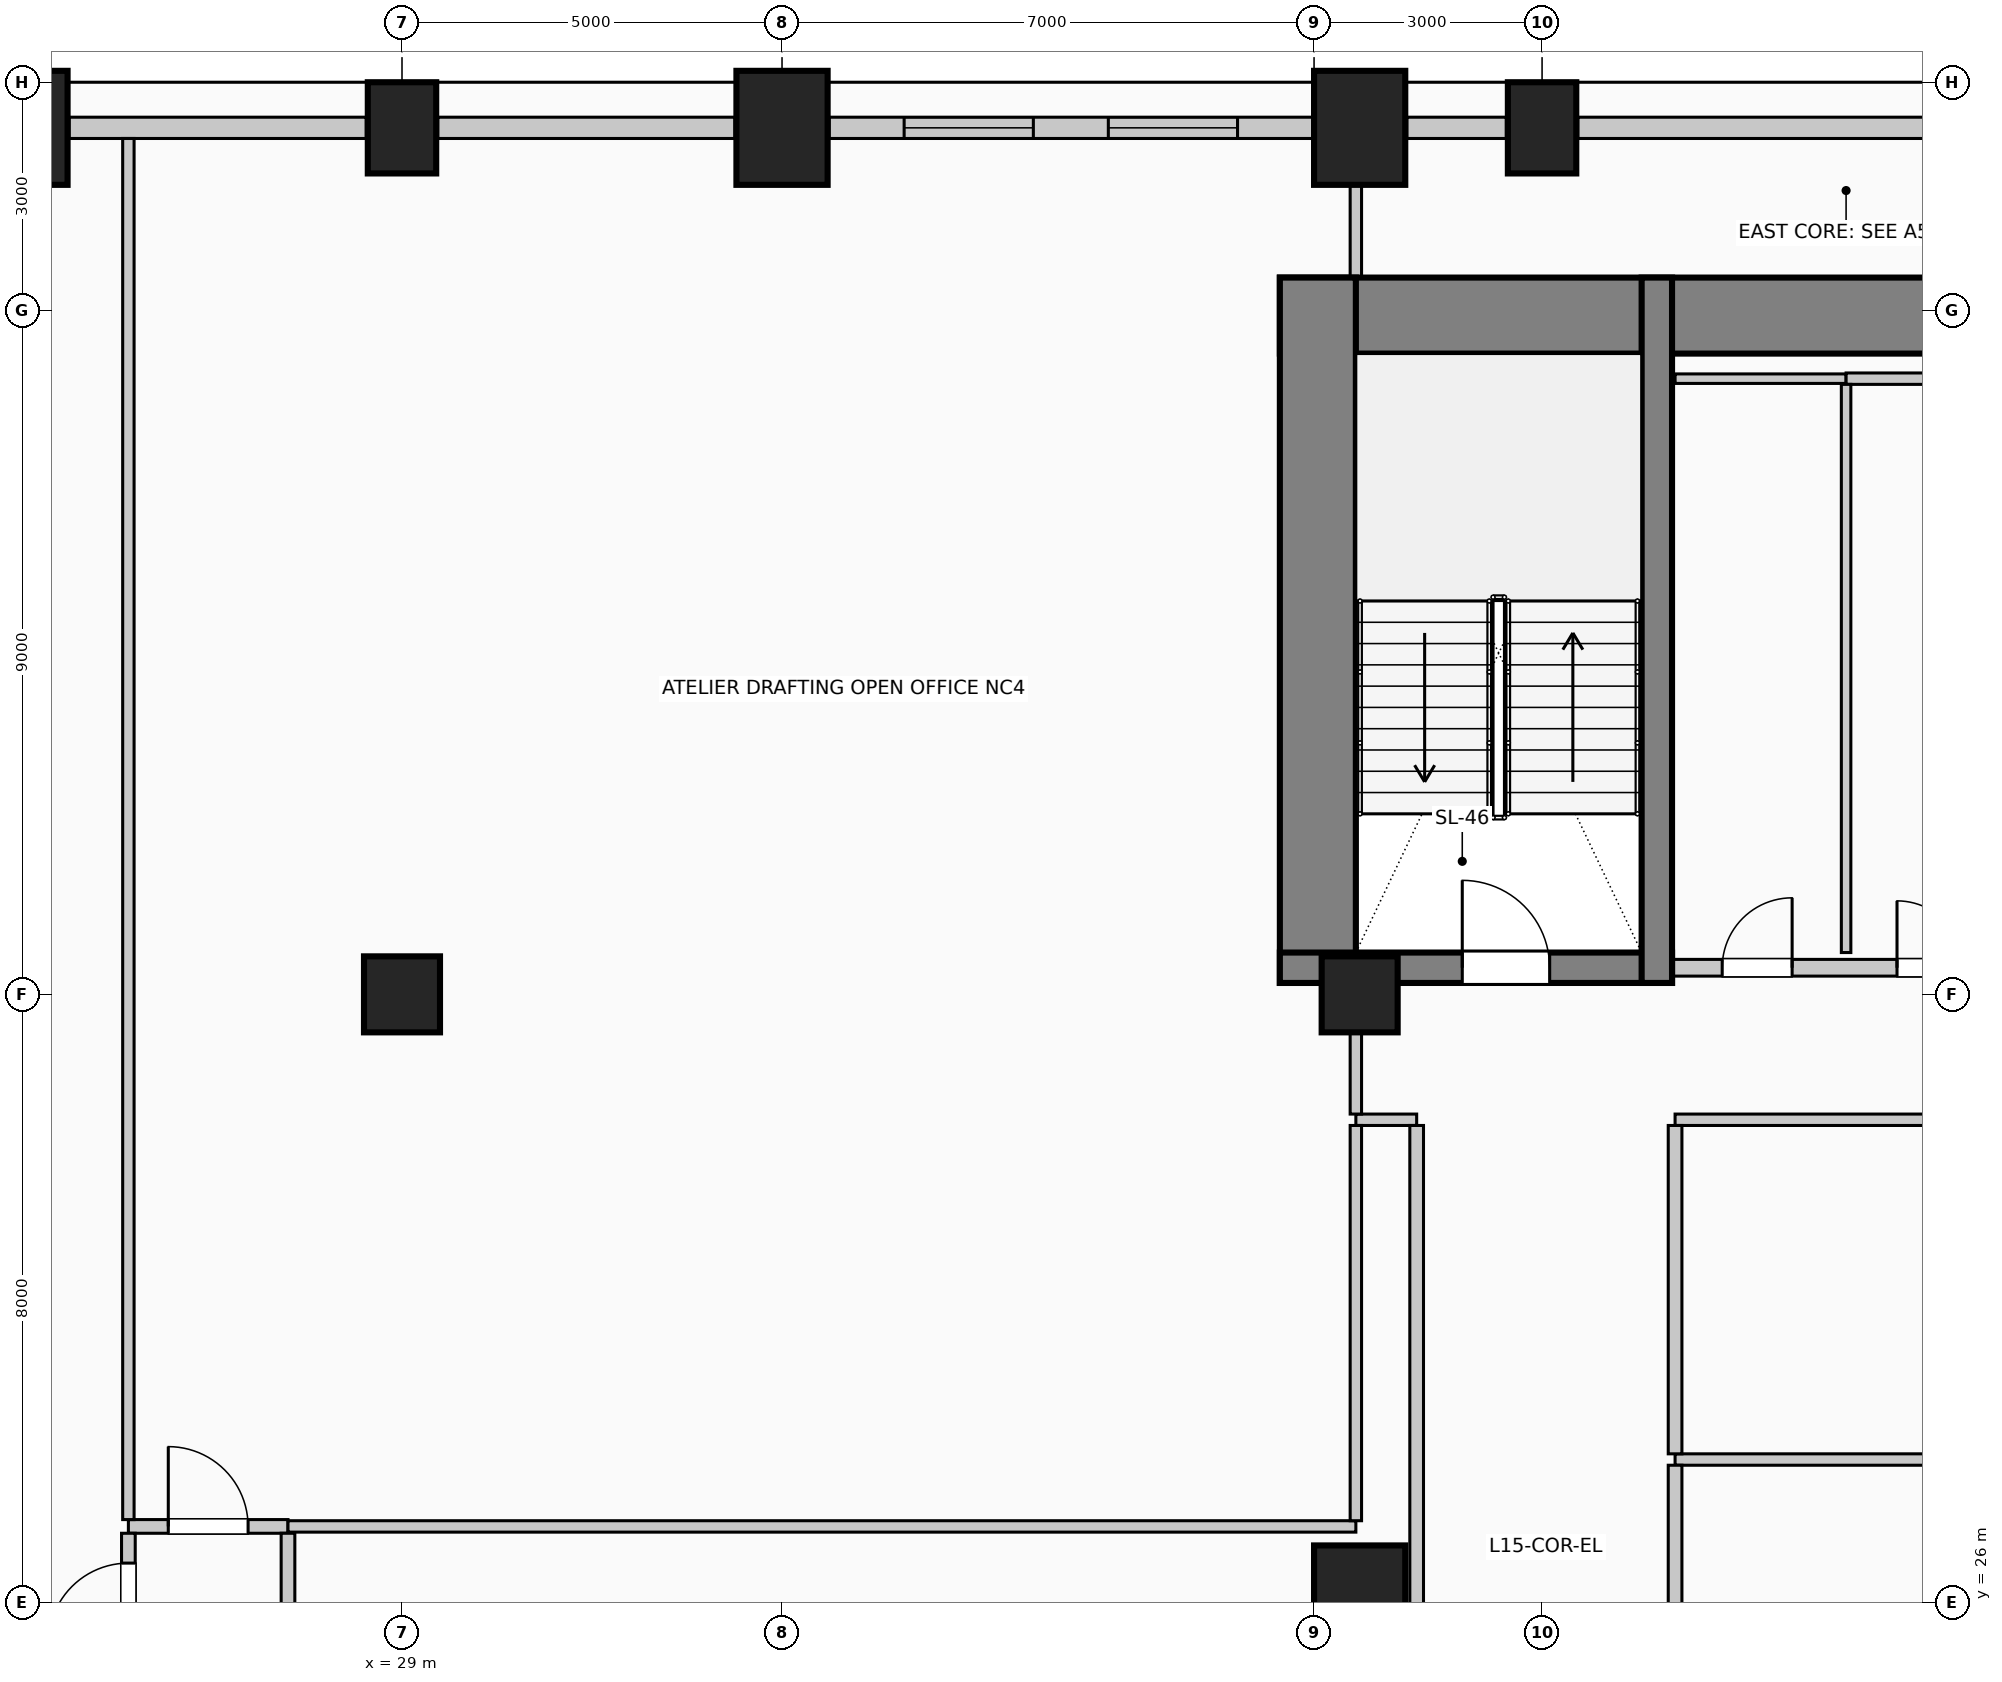
"""IFC4 building model, lengths in metres.
Left out: names, types, materials, properties, quantities, classifications, styles, units other than length and angle.
Written with IfcOpenShell. Run it as: python <this file> out.ifc"""

import sys

from ifc_helpers import new_model, si_unit, direction, frame, frame_2d, origin, origin_2d, place, context, subcontext, project, spatial, rectangle, circle, extrude, element, fill, save


model = new_model("IFC4")
c1 = context("Model", 3, precision=1e-05, world=origin(), true_north=direction((0.0, 1.0)))
c2 = subcontext(c1, "Body", "Model", "MODEL_VIEW")
j1 = project(units=[si_unit("LENGTHUNIT", "METRE"), si_unit("PLANEANGLEUNIT", "RADIAN")], contexts=[c1])
p1 = place(None, origin())
s1 = spatial("IfcSite", under=j1, at=p1, CompositionType="ELEMENT")
p2 = place(p1, origin())
s2 = spatial("IfcBuilding", under=s1, at=p2, CompositionType="ELEMENT")
p3 = place(p2, frame((0.0, 0.0, 62.6)))
s3 = spatial("IfcBuildingStorey", under=s2, at=p3, CompositionType="ELEMENT", Elevation=62.6)
p4 = place(p3, frame((40.55, 42.93, 0.0), z_axis=(0.0, 0.0, 1.0), x_axis=(1.0, 0.0, 0.0)))
e1 = element("IfcWall", 1, at=p4, inside=s3, PredefinedType="SHEAR", context=c2, shape_type="SweptSolid", body=[
    extrude(rectangle(XDim=14.9, YDim=1.0, at=frame_2d((7.45, 0.0))), origin(), (0.0, 0.0, 1.0), 4.0),
])
p5 = place(p3, frame((41.05, 34.15, 0.0), z_axis=(0.0, 0.0, 1.0), x_axis=(0.0, 1.0, 0.0)))
e2 = element("IfcWall", 2, at=p5, inside=s3, PredefinedType="SHEAR", context=c2, shape_type="SweptSolid", body=[
    extrude(rectangle(XDim=9.28, YDim=1.0, at=frame_2d((4.64, 0.0))), origin(), (0.0, 0.0, 1.0), 4.0),
])
p6 = place(p3, frame((40.55, 34.35, 0.0), z_axis=(0.0, 0.0, 1.0), x_axis=(1.0, 0.0, 0.0)))
e3 = element("IfcWall", 3, at=p6, inside=s3, PredefinedType="SHEAR", context=c2, shape_type="SweptSolid", body=[
    extrude(rectangle(XDim=5.16, YDim=0.4, at=frame_2d((2.58, 0.0))), origin(), (0.0, 0.0, 1.0), 4.0),
])
p7 = place(p6, frame((2.4, 0.0, 0.0)))
e4 = element("IfcOpeningElement", 4, at=p7, cuts=e3, PredefinedType="OPENING", context=c2, shape_type="SweptSolid", body=[
    extrude(rectangle(XDim=1.15, YDim=2.2, at=frame_2d((0.575, 1.1))), frame((0.0, 0.21, 0.0), z_axis=(0.0, -1.0, 0.0), x_axis=(1.0, 0.0, 0.0)), (0.0, 0.0, 1.0), 0.42),
])
p8 = place(p3, frame((45.51, 34.15, 0.0), z_axis=(0.0, 0.0, 1.0), x_axis=(0.0, 1.0, 0.0)))
e5 = element("IfcWall", 5, at=p8, inside=s3, PredefinedType="SHEAR", context=c2, shape_type="SweptSolid", body=[
    extrude(rectangle(XDim=9.28, YDim=0.4, at=frame_2d((4.64, 0.0))), origin(), (0.0, 0.0, 1.0), 4.0),
])
p9 = place(p3, frame((24.0, 45.4, 0.0), z_axis=(0.0, 0.0, 1.0), x_axis=(1.0, 0.0, 0.0)))
e6 = element("IfcColumn", 6, at=p9, inside=s3, PredefinedType="COLUMN", context=c2, shape_type="SweptSolid", body=[
    extrude(rectangle(XDim=1.2, YDim=1.5, at=origin_2d()), origin(), (0.0, 0.0, 1.0), 4.0),
])
p10 = place(p3, frame((29.0, 45.4, 0.0), z_axis=(0.0, 0.0, 1.0), x_axis=(1.0, 0.0, 0.0)))
e7 = element("IfcColumn", 7, at=p10, inside=s3, PredefinedType="COLUMN", context=c2, shape_type="SweptSolid", body=[
    extrude(rectangle(XDim=0.9, YDim=1.2, at=origin_2d()), origin(), (0.0, 0.0, 1.0), 4.0),
])
for number, where, z_axis, x_axis in (
    (8, (34.0, 45.4, 0.0), (0.0, 0.0, 1.0), (1.0, 0.0, 0.0)),
    (9, (41.6, 45.4, 0.0), (0.0, 0.0, 1.0), (1.0, 0.0, 0.0)),
):
    element("IfcColumn", number, at=place(p3, frame(where, z_axis=z_axis, x_axis=x_axis)), inside=s3, PredefinedType="COLUMN", context=c2, shape_type="SweptSolid", body=[
        extrude(rectangle(XDim=1.2, YDim=1.5, at=origin_2d()), origin(), (0.0, 0.0, 1.0), 4.0),
    ])
p11 = place(p3, frame((44.0, 45.4, 0.0), z_axis=(0.0, 0.0, 1.0), x_axis=(1.0, 0.0, 0.0)))
e10 = element("IfcColumn", 10, at=p11, inside=s3, PredefinedType="COLUMN", context=c2, shape_type="SweptSolid", body=[
    extrude(rectangle(XDim=0.9, YDim=1.2, at=origin_2d()), origin(), (0.0, 0.0, 1.0), 4.0),
])
p12 = place(p3, frame((41.6, 26.0, 0.0), z_axis=(0.0, 0.0, 1.0), x_axis=(1.0, 0.0, 0.0)))
e11 = element("IfcColumn", 11, at=p12, inside=s3, PredefinedType="COLUMN", context=c2, shape_type="SweptSolid", body=[
    extrude(rectangle(XDim=1.2, YDim=1.5, at=origin_2d()), origin(), (0.0, 0.0, 1.0), 4.0),
])
for number, where, z_axis, x_axis in (
    (12, (29.0, 34.0, 0.0), (0.0, 0.0, 1.0), (1.0, 0.0, 0.0)),
    (13, (41.6, 34.0, 0.0), (0.0, 0.0, 1.0), (1.0, 0.0, 0.0)),
):
    element("IfcColumn", number, at=place(p3, frame(where, z_axis=z_axis, x_axis=x_axis)), inside=s3, PredefinedType="COLUMN", context=c2, shape_type="SweptSolid", body=[
        extrude(circle(Radius=0.5, at=origin_2d()), origin(), (0.0, 0.0, 1.0), 4.0),
    ])
for number, where, z_axis, x_axis in (
    (14, (24.62, 45.4, 0.0), (0.0, 0.0, 1.0), (1.0, 0.0, 0.0)),
    (15, (29.47, 45.4, 0.0), (0.0, 0.0, 1.0), (1.0, 0.0, 0.0)),
):
    element("IfcWall", number, at=place(p3, frame(where, z_axis=z_axis, x_axis=x_axis)), inside=s3, PredefinedType="SOLIDWALL", context=c2, shape_type="SweptSolid", body=[
        extrude(rectangle(XDim=3.91, YDim=0.28, at=frame_2d((1.955, 0.0))), origin(), (0.0, 0.0, 1.0), 2.85),
    ])
p13 = place(p3, frame((34.62, 45.4, 0.0), z_axis=(0.0, 0.0, 1.0), x_axis=(1.0, 0.0, 0.0)))
e16 = element("IfcWall", 16, at=p13, inside=s3, PredefinedType="SOLIDWALL", context=c2, shape_type="SweptSolid", body=[
    extrude(rectangle(XDim=6.36, YDim=0.28, at=frame_2d((3.18, 0.0))), origin(), (0.0, 0.0, 1.0), 2.85),
])
p14 = place(p13, frame((0.987, 0.0, 0.5)))
e17 = element("IfcOpeningElement", 17, at=p14, cuts=e16, PredefinedType="OPENING", context=c2, shape_type="SweptSolid", body=[
    extrude(rectangle(XDim=1.7, YDim=1.95, at=frame_2d((0.85, 0.975))), frame((0.0, 0.15, 0.0), z_axis=(0.0, -1.0, 0.0), x_axis=(1.0, 0.0, 0.0)), (0.0, 0.0, 1.0), 0.3),
])
p15 = place(p13, frame((3.673, 0.0, 0.5)))
e18 = element("IfcOpeningElement", 18, at=p15, cuts=e16, PredefinedType="OPENING", context=c2, shape_type="SweptSolid", body=[
    extrude(rectangle(XDim=1.7, YDim=1.95, at=frame_2d((0.85, 0.975))), frame((0.0, 0.15, 0.0), z_axis=(0.0, -1.0, 0.0), x_axis=(1.0, 0.0, 0.0)), (0.0, 0.0, 1.0), 0.3),
])
p16 = place(p3, frame((42.22, 45.4, 0.0), z_axis=(0.0, 0.0, 1.0), x_axis=(1.0, 0.0, 0.0)))
e19 = element("IfcWall", 19, at=p16, inside=s3, PredefinedType="SOLIDWALL", context=c2, shape_type="SweptSolid", body=[
    extrude(rectangle(XDim=1.31, YDim=0.28, at=frame_2d((0.655, 0.0))), origin(), (0.0, 0.0, 1.0), 2.85),
])
p17 = place(p3, frame((44.47, 45.4, 0.0), z_axis=(0.0, 0.0, 1.0), x_axis=(1.0, 0.0, 0.0)))
e20 = element("IfcWall", 20, at=p17, inside=s3, PredefinedType="SOLIDWALL", context=c2, shape_type="SweptSolid", body=[
    extrude(rectangle(XDim=4.56, YDim=0.28, at=frame_2d((2.28, 0.0))), origin(), (0.0, 0.0, 1.0), 2.85),
])
p18 = place(p3, frame((45.72, 34.35, 0.0), z_axis=(0.0, 0.0, 1.0), x_axis=(1.0, 0.0, 0.0)))
e21 = element("IfcWall", 21, at=p18, inside=s3, PredefinedType="PARTITIONING", context=c2, shape_type="SweptSolid", body=[
    extrude(rectangle(XDim=4.56, YDim=0.22, at=frame_2d((2.28, 0.0))), origin(), (0.0, 0.0, 1.0), 3.7),
])
p19 = place(p18, frame((0.65, 0.0, 0.0)))
e22 = element("IfcOpeningElement", 22, at=p19, cuts=e21, PredefinedType="OPENING", context=c2, shape_type="SweptSolid", body=[
    extrude(rectangle(XDim=0.92, YDim=2.1, at=frame_2d((0.46, 1.05))), frame((0.0, 0.12, 0.0), z_axis=(0.0, -1.0, 0.0), x_axis=(1.0, 0.0, 0.0)), (0.0, 0.0, 1.0), 0.24),
])
p20 = place(p18, frame((2.95, 0.0, 0.0)))
e23 = element("IfcOpeningElement", 23, at=p20, cuts=e21, PredefinedType="OPENING", context=c2, shape_type="SweptSolid", body=[
    extrude(rectangle(XDim=0.88, YDim=2.1, at=frame_2d((0.44, 1.05))), frame((0.0, 0.12, 0.0), z_axis=(0.0, -1.0, 0.0), x_axis=(1.0, 0.0, 0.0)), (0.0, 0.0, 1.0), 0.24),
])
p21 = place(p3, frame((25.4, 27.0, 0.0), z_axis=(0.0, 0.0, 1.0), x_axis=(1.0, 0.0, 0.0)))
e24 = element("IfcWall", 24, at=p21, inside=s3, PredefinedType="PARTITIONING", context=c2, shape_type="SweptSolid", body=[
    extrude(rectangle(XDim=2.1, YDim=0.18, at=frame_2d((1.05, 0.0))), origin(), (0.0, 0.0, 1.0), 3.7),
])
p22 = place(p21, frame((0.525, 0.0, 0.0)))
e25 = element("IfcOpeningElement", 25, at=p22, cuts=e24, PredefinedType="OPENING", context=c2, shape_type="SweptSolid", body=[
    extrude(rectangle(XDim=1.05, YDim=2.15, at=frame_2d((0.525, 1.075))), frame((0.0, 0.1, 0.0), z_axis=(0.0, -1.0, 0.0), x_axis=(1.0, 0.0, 0.0)), (0.0, 0.0, 1.0), 0.2),
])
p23 = place(p3, frame((27.5, 27.0, 0.0), z_axis=(0.0, 0.0, 1.0), x_axis=(1.0, 0.0, 0.0)))
e26 = element("IfcWall", 26, at=p23, inside=s3, PredefinedType="PARTITIONING", context=c2, shape_type="SweptSolid", body=[
    extrude(rectangle(XDim=14.05, YDim=0.15, at=frame_2d((7.025, 0.0))), origin(), (0.0, 0.0, 1.0), 3.7),
])
p24 = place(p3, frame((45.75, 27.88, 0.0), z_axis=(0.0, 0.0, 1.0), x_axis=(1.0, 0.0, 0.0)))
e27 = element("IfcWall", 27, at=p24, inside=s3, PredefinedType="PARTITIONING", context=c2, shape_type="SweptSolid", body=[
    extrude(rectangle(XDim=11.51, YDim=0.15, at=frame_2d((5.755, 0.0))), origin(), (0.0, 0.0, 1.0), 3.7),
])
p25 = place(p3, frame((41.55, 32.35, 0.0), z_axis=(0.0, 0.0, 1.0), x_axis=(1.0, 0.0, 0.0)))
e28 = element("IfcWall", 28, at=p25, inside=s3, PredefinedType="PARTITIONING", context=c2, shape_type="SweptSolid", body=[
    extrude(rectangle(XDim=0.8, YDim=0.15, at=frame_2d((0.4, 0.0))), origin(), (0.0, 0.0, 1.0), 3.7),
])
p26 = place(p3, frame((45.75, 32.35, 0.0), z_axis=(0.0, 0.0, 1.0), x_axis=(1.0, 0.0, 0.0)))
e29 = element("IfcWall", 29, at=p26, inside=s3, PredefinedType="PARTITIONING", context=c2, shape_type="SweptSolid", body=[
    extrude(rectangle(XDim=8.7, YDim=0.15, at=frame_2d((4.35, 0.0))), origin(), (0.0, 0.0, 1.0), 3.7),
])
p27 = place(p26, frame((3.91, 0.0, 0.0)))
e30 = element("IfcOpeningElement", 30, at=p27, cuts=e29, PredefinedType="OPENING", context=c2, shape_type="SweptSolid", body=[
    extrude(rectangle(XDim=0.88, YDim=2.1, at=frame_2d((0.44, 1.05))), frame((0.0, 0.085, 0.0), z_axis=(0.0, -1.0, 0.0), x_axis=(1.0, 0.0, 0.0)), (0.0, 0.0, 1.0), 0.17),
])
p28 = place(p3, frame((45.75, 42.1, 0.0), z_axis=(0.0, 0.0, 1.0), x_axis=(1.0, 0.0, 0.0)))
e31 = element("IfcWall", 31, at=p28, inside=s3, PredefinedType="PARTITIONING", context=c2, shape_type="SweptSolid", body=[
    extrude(rectangle(XDim=2.25, YDim=0.125, at=frame_2d((1.125, 0.0))), origin(), (0.0, 0.0, 1.0), 3.7),
])
p29 = place(p3, frame((48.0, 42.1, 0.0), z_axis=(0.0, 0.0, 1.0), x_axis=(1.0, 0.0, 0.0)))
e32 = element("IfcWall", 32, at=p29, inside=s3, PredefinedType="PARTITIONING", context=c2, shape_type="SweptSolid", body=[
    extrude(rectangle(XDim=2.25, YDim=0.15, at=frame_2d((1.125, 0.0))), origin(), (0.0, 0.0, 1.0), 3.7),
])
p30 = place(p3, frame((25.4, 25.075, 0.0), z_axis=(0.0, 0.0, 1.0), x_axis=(0.0, 1.0, 0.0)))
e33 = element("IfcWall", 33, at=p30, inside=s3, PredefinedType="PARTITIONING", context=c2, shape_type="SweptSolid", body=[
    extrude(rectangle(XDim=1.835, YDim=0.18, at=frame_2d((0.917, 0.0))), origin(), (0.0, 0.0, 1.0), 3.7),
])
p31 = place(p30, frame((0.393, 0.0, 0.0)))
e34 = element("IfcOpeningElement", 34, at=p31, cuts=e33, PredefinedType="OPENING", context=c2, shape_type="SweptSolid", body=[
    extrude(rectangle(XDim=1.05, YDim=2.15, at=frame_2d((0.525, 1.075))), frame((0.0, 0.1, 0.0), z_axis=(0.0, -1.0, 0.0), x_axis=(1.0, 0.0, 0.0)), (0.0, 0.0, 1.0), 0.2),
])
p32 = place(p3, frame((25.4, 27.09, 0.0), z_axis=(0.0, 0.0, 1.0), x_axis=(0.0, 1.0, 0.0)))
e35 = element("IfcWall", 35, at=p32, inside=s3, PredefinedType="PARTITIONING", context=c2, shape_type="SweptSolid", body=[
    extrude(rectangle(XDim=18.17, YDim=0.15, at=frame_2d((9.085, 0.0))), origin(), (0.0, 0.0, 1.0), 3.7),
])
p33 = place(p3, frame((27.5, 21.19, 0.0), z_axis=(0.0, 0.0, 1.0), x_axis=(0.0, 1.0, 0.0)))
e36 = element("IfcWall", 36, at=p33, inside=s3, PredefinedType="PARTITIONING", context=c2, shape_type="SweptSolid", body=[
    extrude(rectangle(XDim=5.72, YDim=0.18, at=frame_2d((2.86, 0.0))), origin(), (0.0, 0.0, 1.0), 3.7),
])
p34 = place(p3, frame((41.55, 27.075, 0.0), z_axis=(0.0, 0.0, 1.0), x_axis=(0.0, 1.0, 0.0)))
e37 = element("IfcWall", 37, at=p34, inside=s3, PredefinedType="PARTITIONING", context=c2, shape_type="SweptSolid", body=[
    extrude(rectangle(XDim=5.2, YDim=0.15, at=frame_2d((2.6, 0.0))), origin(), (0.0, 0.0, 1.0), 2.995),
])
p35 = place(p3, frame((41.55, 32.425, 0.0), z_axis=(0.0, 0.0, 1.0), x_axis=(0.0, 1.0, 0.0)))
e38 = element("IfcWall", 38, at=p35, inside=s3, PredefinedType="PARTITIONING", context=c2, shape_type="SweptSolid", body=[
    extrude(rectangle(XDim=1.075, YDim=0.15, at=frame_2d((0.538, 0.0))), origin(), (0.0, 0.0, 1.0), 2.995),
])
p36 = place(p3, frame((41.55, 43.43, 0.0), z_axis=(0.0, 0.0, 1.0), x_axis=(0.0, 1.0, 0.0)))
e39 = element("IfcWall", 39, at=p36, inside=s3, PredefinedType="PARTITIONING", context=c2, shape_type="SweptSolid", body=[
    extrude(rectangle(XDim=1.22, YDim=0.15, at=frame_2d((0.61, 0.0))), origin(), (0.0, 0.0, 1.0), 3.7),
])
p37 = place(p3, frame((42.35, 21.19, 0.0), z_axis=(0.0, 0.0, 1.0), x_axis=(0.0, 1.0, 0.0)))
e40 = element("IfcWall", 40, at=p37, inside=s3, PredefinedType="PARTITIONING", context=c2, shape_type="SweptSolid", body=[
    extrude(rectangle(XDim=11.085, YDim=0.18, at=frame_2d((5.542, 0.0))), origin(), (0.0, 0.0, 1.0), 3.7),
])
p38 = place(p3, frame((45.75, 21.19, 0.0), z_axis=(0.0, 0.0, 1.0), x_axis=(0.0, 1.0, 0.0)))
e41 = element("IfcWall", 41, at=p38, inside=s3, PredefinedType="PARTITIONING", context=c2, shape_type="SweptSolid", body=[
    extrude(rectangle(XDim=6.615, YDim=0.18, at=frame_2d((3.308, 0.0))), origin(), (0.0, 0.0, 1.0), 3.7),
])
p39 = place(p3, frame((45.75, 27.955, 0.0), z_axis=(0.0, 0.0, 1.0), x_axis=(0.0, 1.0, 0.0)))
e42 = element("IfcWall", 42, at=p39, inside=s3, PredefinedType="PARTITIONING", context=c2, shape_type="SweptSolid", body=[
    extrude(rectangle(XDim=4.32, YDim=0.18, at=frame_2d((2.16, 0.0))), origin(), (0.0, 0.0, 1.0), 3.7),
])
p40 = place(p3, frame((48.0, 34.55, 0.0), z_axis=(0.0, 0.0, 1.0), x_axis=(0.0, 1.0, 0.0)))
e43 = element("IfcWall", 43, at=p40, inside=s3, PredefinedType="PARTITIONING", context=c2, shape_type="SweptSolid", body=[
    extrude(rectangle(XDim=7.475, YDim=0.125, at=frame_2d((3.737, 0.0))), origin(), (0.0, 0.0, 1.0), 3.7),
])
p41 = place(p14, origin())
e44 = element("IfcWindow", 44, at=p41, inside=s3, PartitioningType="SINGLE_PANEL", PredefinedType="WINDOW", context=c2, shape_type="SweptSolid", body=[
    extrude(rectangle(XDim=1.7, YDim=1.95, at=frame_2d((0.85, 0.975))), frame((0.0, 0.03, 0.0), z_axis=(0.0, -1.0, 0.0), x_axis=(1.0, 0.0, 0.0)), (0.0, 0.0, 1.0), 0.06),
])
fill(e17, e44)
p42 = place(p15, origin())
e45 = element("IfcWindow", 45, at=p42, inside=s3, PartitioningType="SINGLE_PANEL", PredefinedType="WINDOW", context=c2, shape_type="SweptSolid", body=[
    extrude(rectangle(XDim=1.7, YDim=1.95, at=frame_2d((0.85, 0.975))), frame((0.0, 0.03, 0.0), z_axis=(0.0, -1.0, 0.0), x_axis=(1.0, 0.0, 0.0)), (0.0, 0.0, 1.0), 0.06),
])
fill(e18, e45)
p43 = place(p7, origin())
e46 = element("IfcDoor", 46, at=p43, inside=s3, OperationType="SINGLE_SWING_LEFT", PredefinedType="DOOR", context=c2, shape_type="SweptSolid", body=[
    extrude(rectangle(XDim=1.15, YDim=2.2, at=frame_2d((0.575, 1.1))), frame((0.0, 0.025, 0.0), z_axis=(0.0, -1.0, 0.0), x_axis=(1.0, 0.0, 0.0)), (0.0, 0.0, 1.0), 0.05),
])
fill(e4, e46)
p44 = place(p19, origin())
e47 = element("IfcDoor", 47, at=p44, inside=s3, OperationType="SINGLE_SWING_RIGHT", PredefinedType="DOOR", context=c2, shape_type="SweptSolid", body=[
    extrude(rectangle(XDim=0.92, YDim=2.1, at=frame_2d((0.46, 1.05))), frame((0.0, 0.025, 0.0), z_axis=(0.0, -1.0, 0.0), x_axis=(1.0, 0.0, 0.0)), (0.0, 0.0, 1.0), 0.05),
])
fill(e22, e47)
p45 = place(p20, origin())
e48 = element("IfcDoor", 48, at=p45, inside=s3, OperationType="SINGLE_SWING_LEFT", PredefinedType="DOOR", context=c2, shape_type="SweptSolid", body=[
    extrude(rectangle(XDim=0.88, YDim=2.1, at=frame_2d((0.44, 1.05))), frame((0.0, 0.025, 0.0), z_axis=(0.0, -1.0, 0.0), x_axis=(1.0, 0.0, 0.0)), (0.0, 0.0, 1.0), 0.05),
])
fill(e23, e48)
p46 = place(p22, origin())
e49 = element("IfcDoor", 49, at=p46, inside=s3, OperationType="SINGLE_SWING_LEFT", PredefinedType="DOOR", context=c2, shape_type="SweptSolid", body=[
    extrude(rectangle(XDim=1.05, YDim=2.15, at=frame_2d((0.525, 1.075))), frame((0.0, 0.025, 0.0), z_axis=(0.0, -1.0, 0.0), x_axis=(1.0, 0.0, 0.0)), (0.0, 0.0, 1.0), 0.05),
])
fill(e25, e49)
p47 = place(p31, origin())
e50 = element("IfcDoor", 50, at=p47, inside=s3, OperationType="SINGLE_SWING_LEFT", PredefinedType="DOOR", context=c2, shape_type="SweptSolid", body=[
    extrude(rectangle(XDim=1.05, YDim=2.15, at=frame_2d((0.525, 1.075))), frame((0.0, 0.025, 0.0), z_axis=(0.0, -1.0, 0.0), x_axis=(1.0, 0.0, 0.0)), (0.0, 0.0, 1.0), 0.05),
])
fill(e34, e50)
save(model, sys.argv[1])
